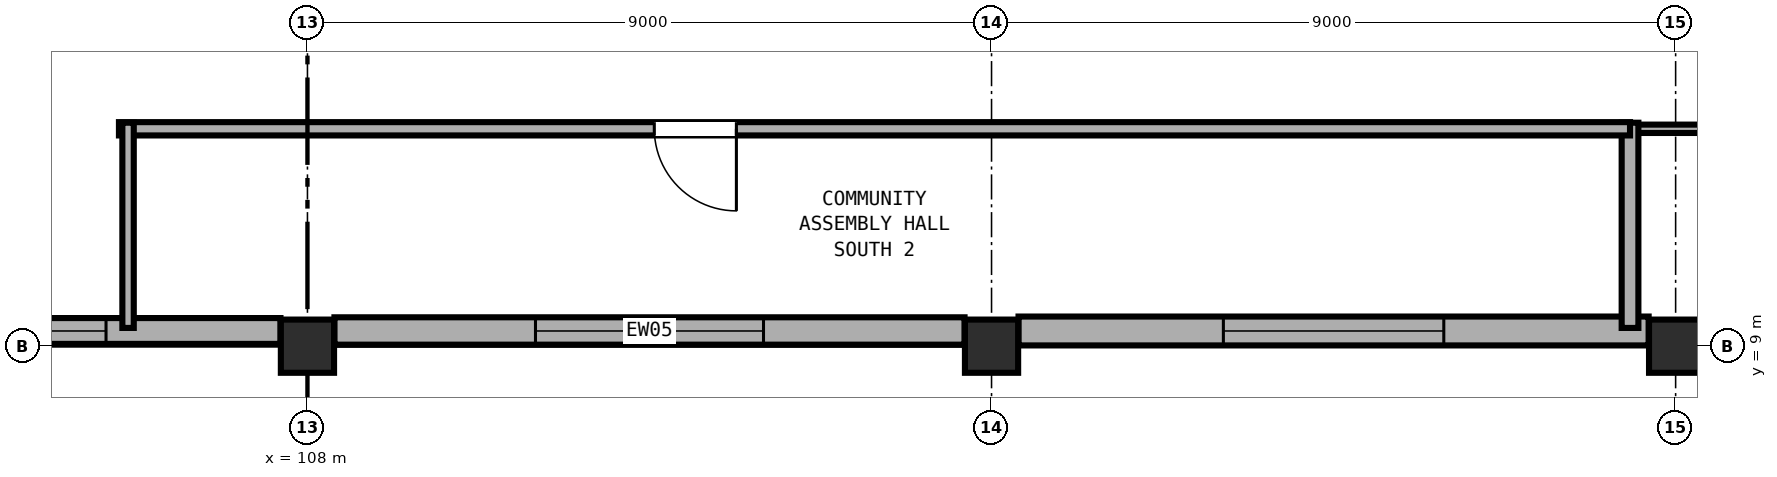
"""IFC4 building model, lengths in metres.
Left out: names, types, materials, properties, quantities, classifications, styles, units other than length and angle.
Written with IfcOpenShell. Run it as: python <this file> out.ifc"""

import sys

from ifc_helpers import new_model, si_unit, direction, frame, frame_2d, origin, origin_2d, place, context, subcontext, project, spatial, rectangle, extrude, element, fill, save


model = new_model("IFC4")
c1 = context("Model", 3, precision=1e-05, world=origin(), true_north=direction((0.0, 1.0)))
c2 = subcontext(c1, "Body", "Model", "MODEL_VIEW")
j1 = project(units=[si_unit("LENGTHUNIT", "METRE"), si_unit("PLANEANGLEUNIT", "RADIAN")], contexts=[c1])
p1 = place(None, origin())
s1 = spatial("IfcSite", under=j1, at=p1, CompositionType="ELEMENT")
p2 = place(p1, origin())
s2 = spatial("IfcBuilding", under=s1, at=p2, CompositionType="ELEMENT")
p3 = place(p2, frame((0.0, 0.0, 9.6)))
s3 = spatial("IfcBuildingStorey", under=s2, at=p3, CompositionType="ELEMENT", Elevation=9.6)
for number, where, z_axis, x_axis in (
    (1, (108.0, 9.0, 0.0), (0.0, 0.0, 1.0), (1.0, 0.0, 0.0)),
    (2, (117.0, 9.0, 0.0), (0.0, 0.0, 1.0), (1.0, 0.0, 0.0)),
    (3, (126.0, 9.0, 0.0), (0.0, 0.0, 1.0), (1.0, 0.0, 0.0)),
):
    element("IfcColumn", number, at=place(p3, frame(where, z_axis=z_axis, x_axis=x_axis)), inside=s3, PredefinedType="COLUMN", context=c2, shape_type="SweptSolid", body=[
        extrude(rectangle(XDim=0.7, YDim=0.7, at=origin_2d()), origin(), (0.0, 0.0, 1.0), 4.8),
    ])
p4 = place(p3, frame((125.645, 9.2, 0.0), z_axis=(0.0, 0.0, 1.0), x_axis=(-1.0, 0.0, 0.0)))
e4 = element("IfcWall", 4, at=p4, inside=s3, PredefinedType="SOLIDWALL", context=c2, shape_type="SweptSolid", body=[
    extrude(rectangle(XDim=8.29, YDim=0.38, at=frame_2d((4.145, 0.0))), origin(), (0.0, 0.0, 1.0), 3.58),
])
p5 = place(p4, frame((2.695, 0.0, 0.9)))
e5 = element("IfcOpeningElement", 5, at=p5, cuts=e4, PredefinedType="OPENING", context=c2, shape_type="SweptSolid", body=[
    extrude(rectangle(XDim=2.9, YDim=2.2, at=frame_2d((1.45, 1.1))), frame((0.0, 0.2, 0.0), z_axis=(0.0, -1.0, 0.0), x_axis=(1.0, 0.0, 0.0)), (0.0, 0.0, 1.0), 0.4),
])
p6 = place(p3, frame((116.645, 9.2, 0.0), z_axis=(0.0, 0.0, 1.0), x_axis=(-1.0, 0.0, 0.0)))
e6 = element("IfcWall", 6, at=p6, inside=s3, PredefinedType="SOLIDWALL", context=c2, shape_type="SweptSolid", body=[
    extrude(rectangle(XDim=8.29, YDim=0.36, at=frame_2d((4.145, 0.0))), origin(), (0.0, 0.0, 1.0), 3.58),
])
p7 = place(p6, frame((2.645, 0.0, 0.9)))
e7 = element("IfcOpeningElement", 7, at=p7, cuts=e6, PredefinedType="OPENING", context=c2, shape_type="SweptSolid", body=[
    extrude(rectangle(XDim=3.0, YDim=2.2, at=frame_2d((1.5, 1.1))), frame((0.0, 0.19, 0.0), z_axis=(0.0, -1.0, 0.0), x_axis=(1.0, 0.0, 0.0)), (0.0, 0.0, 1.0), 0.38),
])
p8 = place(p3, frame((107.645, 9.2, 0.0), z_axis=(0.0, 0.0, 1.0), x_axis=(-1.0, 0.0, 0.0)))
e8 = element("IfcWall", 8, at=p8, inside=s3, PredefinedType="SOLIDWALL", context=c2, shape_type="SweptSolid", body=[
    extrude(rectangle(XDim=8.29, YDim=0.34, at=frame_2d((4.145, 0.0))), origin(), (0.0, 0.0, 1.0), 3.58),
])
p9 = place(p8, frame((2.295, 0.0, 0.9)))
e9 = element("IfcOpeningElement", 9, at=p9, cuts=e8, PredefinedType="OPENING", context=c2, shape_type="SweptSolid", body=[
    extrude(rectangle(XDim=3.1, YDim=2.1, at=frame_2d((1.55, 1.05))), frame((0.0, 0.18, 0.0), z_axis=(0.0, -1.0, 0.0), x_axis=(1.0, 0.0, 0.0)), (0.0, 0.0, 1.0), 0.36),
])
p10 = place(p3, frame((145.28, 11.86, 0.0), z_axis=(0.0, 0.0, 1.0), x_axis=(-1.0, 0.0, 0.0)))
e10 = element("IfcWall", 10, at=p10, inside=s3, PredefinedType="PARTITIONING", context=c2, shape_type="SweptSolid", body=[
    extrude(rectangle(XDim=19.88, YDim=0.11, at=frame_2d((9.94, 0.0))), origin(), (0.0, 0.0, 1.0), 3.56),
])
p11 = place(p10, frame((5.895, 0.0, 0.0)))
e11 = element("IfcOpeningElement", 11, at=p11, cuts=e10, PredefinedType="OPENING", context=c2, shape_type="SweptSolid", body=[
    extrude(rectangle(XDim=1.02, YDim=2.16, at=frame_2d((0.51, 1.08))), frame((0.0, 0.065, 0.0), z_axis=(0.0, -1.0, 0.0), x_axis=(1.0, 0.0, 0.0)), (0.0, 0.0, 1.0), 0.13),
])
p12 = place(p3, frame((125.4, 9.24, 0.0), z_axis=(0.0, 0.0, 1.0), x_axis=(0.0, 1.0, 0.0)))
e12 = element("IfcWall", 12, at=p12, inside=s3, PredefinedType="PARTITIONING", context=c2, shape_type="SweptSolid", body=[
    extrude(rectangle(XDim=2.7, YDim=0.22, at=frame_2d((1.35, 0.0))), origin(), (0.0, 0.0, 1.0), 3.56),
])
p13 = place(p3, frame((125.4, 11.86, 0.0), z_axis=(0.0, 0.0, 1.0), x_axis=(-1.0, 0.0, 0.0)))
e13 = element("IfcWall", 13, at=p13, inside=s3, PredefinedType="PARTITIONING", context=c2, shape_type="SweptSolid", body=[
    extrude(rectangle(XDim=19.88, YDim=0.175, at=frame_2d((9.94, 0.0))), origin(), (0.0, 0.0, 1.0), 3.56),
])
p14 = place(p13, frame((11.757, 0.0, 0.0)))
e14 = element("IfcOpeningElement", 14, at=p14, cuts=e13, PredefinedType="OPENING", context=c2, shape_type="SweptSolid", body=[
    extrude(rectangle(XDim=1.08, YDim=2.18, at=frame_2d((0.54, 1.09))), frame((0.0, 0.097, 0.0), z_axis=(0.0, -1.0, 0.0), x_axis=(1.0, 0.0, 0.0)), (0.0, 0.0, 1.0), 0.195),
])
p15 = place(p3, frame((105.64, 9.24, 0.0), z_axis=(0.0, 0.0, 1.0), x_axis=(0.0, 1.0, 0.0)))
e15 = element("IfcWall", 15, at=p15, inside=s3, PredefinedType="PARTITIONING", context=c2, shape_type="SweptSolid", body=[
    extrude(rectangle(XDim=2.7, YDim=0.15, at=frame_2d((1.35, 0.0))), origin(), (0.0, 0.0, 1.0), 3.56),
])
p16 = place(p5, origin())
e16 = element("IfcWindow", 16, at=p16, inside=s3, PartitioningType="DOUBLE_PANEL_VERTICAL", PredefinedType="WINDOW", context=c2, shape_type="SweptSolid", body=[
    extrude(rectangle(XDim=2.9, YDim=2.2, at=frame_2d((1.45, 1.1))), frame((0.0, 0.03, 0.0), z_axis=(0.0, -1.0, 0.0), x_axis=(1.0, 0.0, 0.0)), (0.0, 0.0, 1.0), 0.06),
])
fill(e5, e16)
p17 = place(p7, origin())
e17 = element("IfcWindow", 17, at=p17, inside=s3, PartitioningType="DOUBLE_PANEL_VERTICAL", PredefinedType="WINDOW", context=c2, shape_type="SweptSolid", body=[
    extrude(rectangle(XDim=3.0, YDim=2.2, at=frame_2d((1.5, 1.1))), frame((0.0, 0.03, 0.0), z_axis=(0.0, -1.0, 0.0), x_axis=(1.0, 0.0, 0.0)), (0.0, 0.0, 1.0), 0.06),
])
fill(e7, e17)
p18 = place(p9, origin())
e18 = element("IfcWindow", 18, at=p18, inside=s3, PartitioningType="DOUBLE_PANEL_VERTICAL", PredefinedType="WINDOW", context=c2, shape_type="SweptSolid", body=[
    extrude(rectangle(XDim=3.1, YDim=2.1, at=frame_2d((1.55, 1.05))), frame((0.0, 0.03, 0.0), z_axis=(0.0, -1.0, 0.0), x_axis=(1.0, 0.0, 0.0)), (0.0, 0.0, 1.0), 0.06),
])
fill(e9, e18)
p19 = place(p14, origin())
e19 = element("IfcDoor", 19, at=p19, inside=s3, OperationType="SINGLE_SWING_LEFT", PredefinedType="DOOR", context=c2, shape_type="SweptSolid", body=[
    extrude(rectangle(XDim=1.08, YDim=2.18, at=frame_2d((0.54, 1.09))), frame((0.0, 0.025, 0.0), z_axis=(0.0, -1.0, 0.0), x_axis=(1.0, 0.0, 0.0)), (0.0, 0.0, 1.0), 0.05),
])
fill(e14, e19)
save(model, sys.argv[1])
